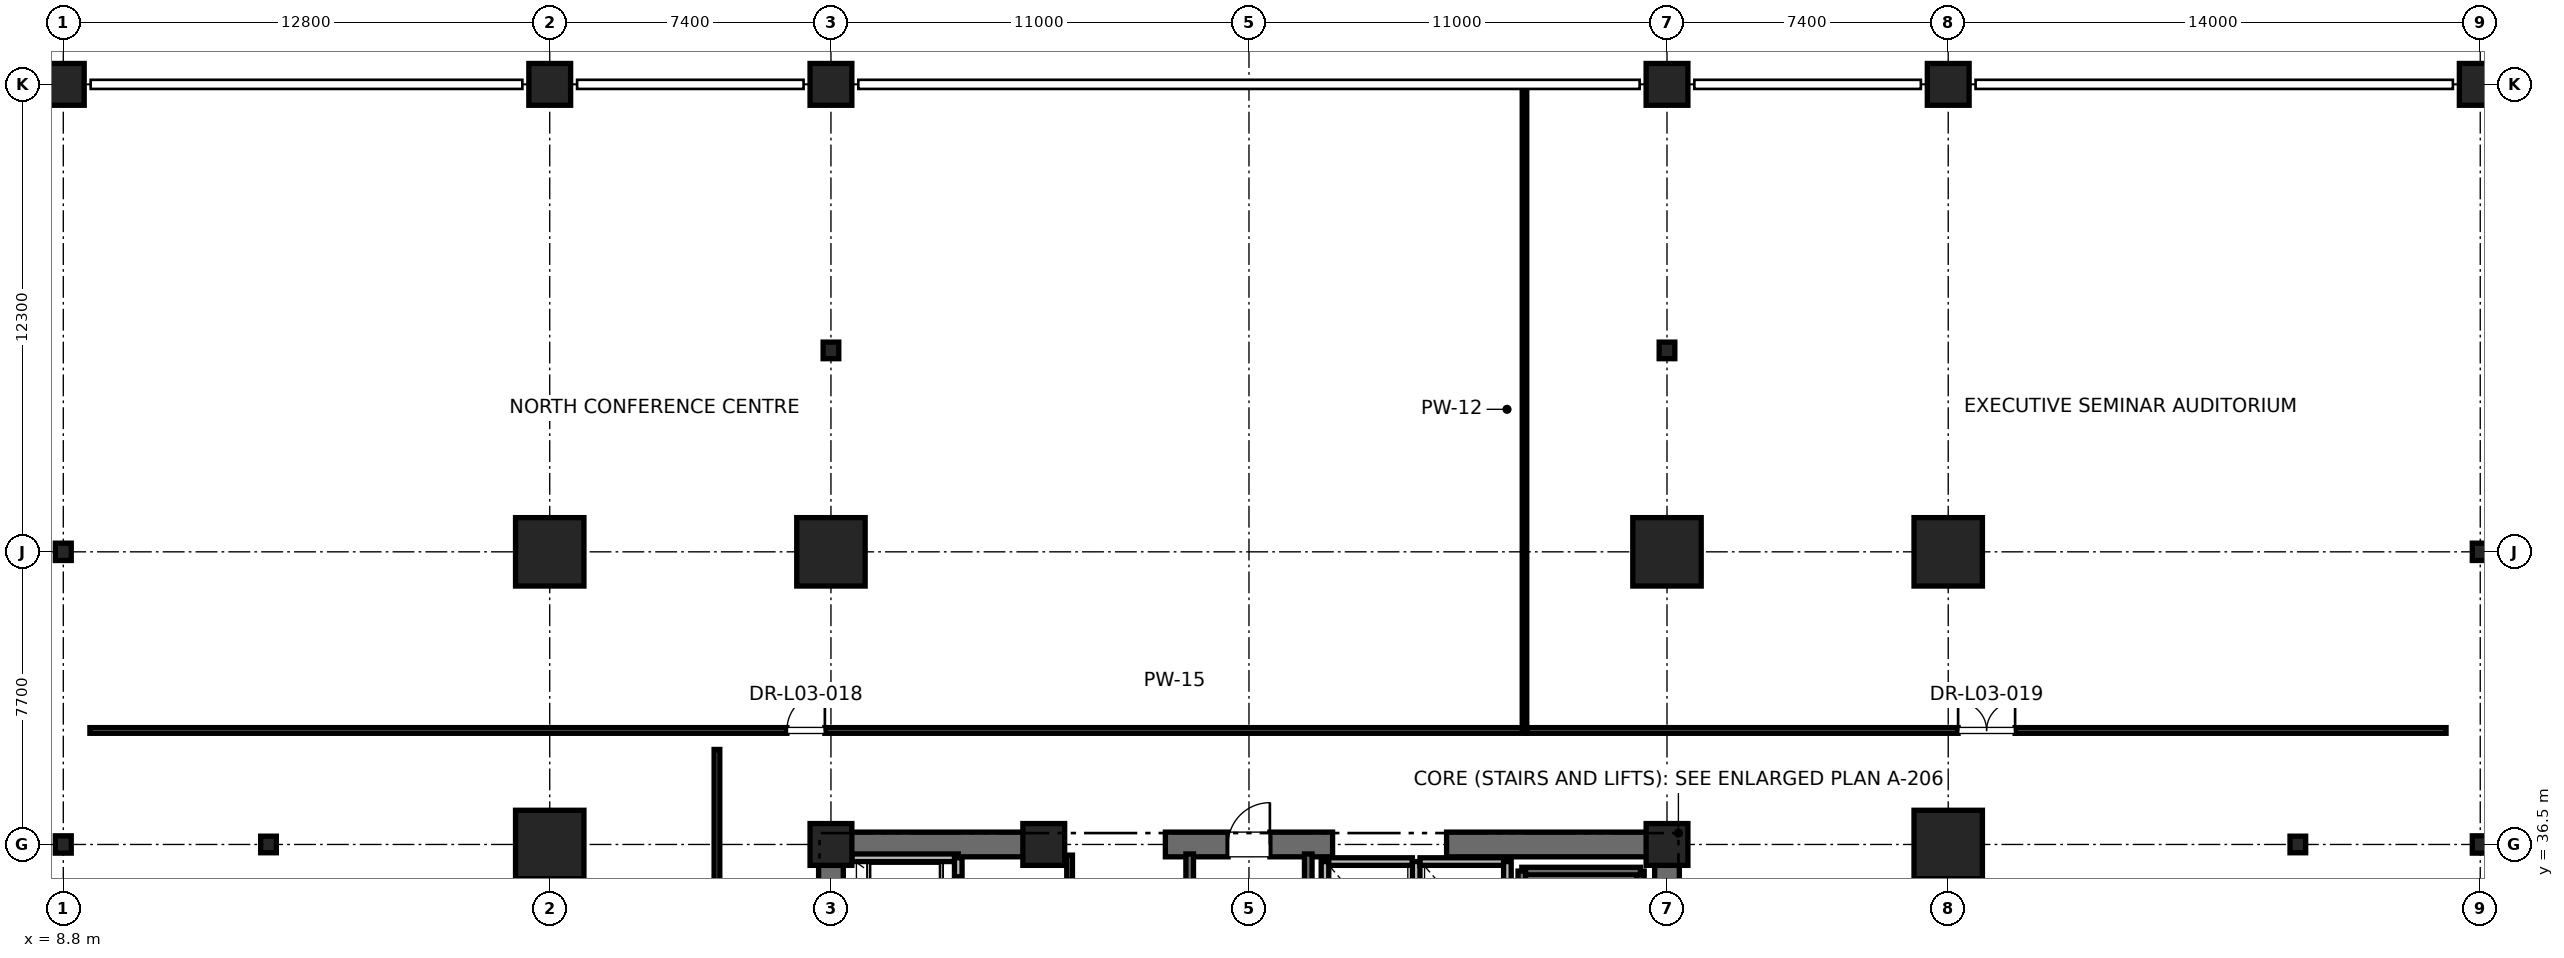
"""IFC4 building model, lengths in metres.
Left out: names, types, materials, properties, quantities, classifications, styles, units other than length and angle.
Written with IfcOpenShell. Run it as: python <this file> out.ifc"""

import sys

from ifc_helpers import new_model, si_unit, direction, frame, frame_2d, origin, origin_2d, place, context, subcontext, project, spatial, rectangle, i_section, extrude, element, fill, save


model = new_model("IFC4")
c1 = context("Model", 3, precision=1e-05, world=origin(), true_north=direction((0.0, 1.0)))
c2 = subcontext(c1, "Body", "Model", "MODEL_VIEW")
j1 = project(units=[si_unit("LENGTHUNIT", "METRE"), si_unit("PLANEANGLEUNIT", "RADIAN")], contexts=[c1])
p1 = place(None, origin())
s1 = spatial("IfcSite", under=j1, at=p1, CompositionType="ELEMENT")
p2 = place(p1, origin())
s2 = spatial("IfcBuilding", under=s1, at=p2, CompositionType="ELEMENT")
p3 = place(p2, frame((0.0, 0.0, 16.4)))
s3 = spatial("IfcBuildingStorey", under=s2, at=p3, CompositionType="ELEMENT", Elevation=16.4)
for number, where, z_axis, x_axis in (
    (1, (29.0, 44.2, 0.0), (0.0, 0.0, 1.0), (1.0, 0.0, 0.0)),
    (2, (51.0, 44.2, 0.0), (0.0, 0.0, 1.0), (1.0, 0.0, 0.0)),
    (3, (21.6, 36.5, 0.0), (0.0, 0.0, 1.0), (1.0, 0.0, 0.0)),
    (4, (58.4, 36.5, 0.0), (0.0, 0.0, 1.0), (1.0, 0.0, 0.0)),
    (5, (21.6, 44.2, 0.0), (0.0, 0.0, 1.0), (1.0, 0.0, 0.0)),
    (6, (58.4, 44.2, 0.0), (0.0, 0.0, 1.0), (1.0, 0.0, 0.0)),
):
    element("IfcColumn", number, at=place(p3, frame(where, z_axis=z_axis, x_axis=x_axis)), inside=s3, PredefinedType="COLUMN", context=c2, shape_type="SweptSolid", body=[
        extrude(rectangle(XDim=1.8, YDim=1.8, at=origin_2d()), origin(), (0.0, 0.0, 1.0), 5.2),
    ])
for number, where, z_axis, x_axis in (
    (7, (14.2, 36.5, 0.0), (0.0, 0.0, 1.0), (1.0, 0.0, 0.0)),
    (8, (67.6, 36.5, 0.0), (0.0, 0.0, 1.0), (1.0, 0.0, 0.0)),
    (9, (29.0, 49.5, 0.0), (0.0, 0.0, 1.0), (1.0, 0.0, 0.0)),
    (10, (51.0, 49.5, 0.0), (0.0, 0.0, 1.0), (1.0, 0.0, 0.0)),
):
    element("IfcColumn", number, at=place(p3, frame(where, z_axis=z_axis, x_axis=x_axis)), inside=s3, PredefinedType="COLUMN", context=c2, shape_type="SweptSolid", body=[
        extrude(i_section(OverallWidth=0.412, OverallDepth=0.437, WebThickness=0.036, FlangeThickness=0.058, FilletRadius=0.015, at=origin_2d()), origin(), (0.0, 0.0, 1.0), 5.2),
    ])
for number, where, z_axis, x_axis in (
    (11, (29.0, 36.5, 0.0), (0.0, 0.0, 1.0), (1.0, 0.0, 0.0)),
    (12, (51.0, 36.5, 0.0), (0.0, 0.0, 1.0), (1.0, 0.0, 0.0)),
    (13, (34.6, 36.5, 0.0), (0.0, 0.0, 1.0), (1.0, 0.0, 0.0)),
):
    element("IfcColumn", number, at=place(p3, frame(where, z_axis=z_axis, x_axis=x_axis)), inside=s3, PredefinedType="PILASTER", context=c2, shape_type="SweptSolid", body=[
        extrude(rectangle(XDim=1.1, YDim=1.1, at=origin_2d()), origin(), (0.0, 0.0, 1.0), 5.2),
    ])
for number, where, z_axis, x_axis in (
    (14, (8.8, 56.5, 0.0), (0.0, 0.0, 1.0), (1.0, 0.0, 0.0)),
    (15, (21.6, 56.5, 0.0), (0.0, 0.0, 1.0), (1.0, 0.0, 0.0)),
    (16, (29.0, 56.5, 0.0), (0.0, 0.0, 1.0), (1.0, 0.0, 0.0)),
    (17, (51.0, 56.5, 0.0), (0.0, 0.0, 1.0), (1.0, 0.0, 0.0)),
    (18, (58.4, 56.5, 0.0), (0.0, 0.0, 1.0), (1.0, 0.0, 0.0)),
    (19, (72.4, 56.5, 0.0), (0.0, 0.0, 1.0), (1.0, 0.0, 0.0)),
):
    element("IfcColumn", number, at=place(p3, frame(where, z_axis=z_axis, x_axis=x_axis)), inside=s3, PredefinedType="COLUMN", context=c2, shape_type="SweptSolid", body=[
        extrude(rectangle(XDim=1.1, YDim=1.1, at=origin_2d()), origin(), (0.0, 0.0, 1.0), 5.2),
    ])
for number, where, z_axis, x_axis in (
    (20, (8.8, 36.5, 0.0), (0.0, 0.0, 1.0), (1.0, 0.0, 0.0)),
    (21, (8.8, 44.2, 0.0), (0.0, 0.0, 1.0), (1.0, 0.0, 0.0)),
    (22, (72.4, 36.5, 0.0), (0.0, 0.0, 1.0), (1.0, 0.0, 0.0)),
    (23, (72.4, 44.2, 0.0), (0.0, 0.0, 1.0), (1.0, 0.0, 0.0)),
):
    element("IfcColumn", number, at=place(p3, frame(where, z_axis=z_axis, x_axis=x_axis)), inside=s3, PredefinedType="COLUMN", context=c2, shape_type="SweptSolid", body=[
        extrude(i_section(OverallWidth=0.418, OverallDepth=0.456, WebThickness=0.042, FlangeThickness=0.067, FilletRadius=0.015, at=origin_2d()), origin(), (0.0, 0.0, 1.0), 5.2),
    ])
p4 = place(p3, frame((29.0, 36.5, 0.0), z_axis=(0.0, 0.0, 1.0), x_axis=(1.0, 0.0, 0.0)))
e24 = element("IfcWall", 24, at=p4, inside=s3, PredefinedType="SHEAR", context=c2, shape_type="SweptSolid", body=[
    extrude(rectangle(XDim=5.8, YDim=0.65, at=frame_2d((2.9, 0.0))), origin(), (0.0, 0.0, 1.0), 4.9),
])
p5 = place(p3, frame((37.8, 36.5, 0.0), z_axis=(0.0, 0.0, 1.0), x_axis=(1.0, 0.0, 0.0)))
e25 = element("IfcWall", 25, at=p5, inside=s3, PredefinedType="SHEAR", context=c2, shape_type="SweptSolid", body=[
    extrude(rectangle(XDim=4.4, YDim=0.65, at=frame_2d((2.2, 0.0))), origin(), (0.0, 0.0, 1.0), 4.9),
])
p6 = place(p5, frame((1.65, 0.0, 0.0)))
e26 = element("IfcOpeningElement", 26, at=p6, cuts=e25, PredefinedType="OPENING", context=c2, shape_type="SweptSolid", body=[
    extrude(rectangle(XDim=1.1, YDim=2.15, at=frame_2d((0.55, 1.075))), frame((0.0, 0.325, 0.0), z_axis=(0.0, -1.0, 0.0), x_axis=(1.0, 0.0, 0.0)), (0.0, 0.0, 1.0), 0.65),
])
for number, where, z_axis, x_axis in (
    (27, (45.2, 36.5, 0.0), (0.0, 0.0, 1.0), (1.0, 0.0, 0.0)),
    (28, (29.0, 30.7, 0.0), (0.0, 0.0, 1.0), (0.0, 1.0, 0.0)),
):
    element("IfcWall", number, at=place(p3, frame(where, z_axis=z_axis, x_axis=x_axis)), inside=s3, PredefinedType="SHEAR", context=c2, shape_type="SweptSolid", body=[
        extrude(rectangle(XDim=5.8, YDim=0.65, at=frame_2d((2.9, 0.0))), origin(), (0.0, 0.0, 1.0), 4.9),
    ])
p7 = place(p3, frame((51.0, 27.7, 0.0), z_axis=(0.0, 0.0, 1.0), x_axis=(0.0, 1.0, 0.0)))
e29 = element("IfcWall", 29, at=p7, inside=s3, PredefinedType="SHEAR", context=c2, shape_type="SweptSolid", body=[
    extrude(rectangle(XDim=8.8, YDim=0.65, at=frame_2d((4.4, 0.0))), origin(), (0.0, 0.0, 1.0), 4.9),
])
p8 = place(p3, frame((50.3, 27.65, 0.0), z_axis=(0.0, 0.0, 1.0), x_axis=(0.0, 1.0, 0.0)))
e30 = element("IfcWall", 30, at=p8, inside=s3, PredefinedType="SOLIDWALL", context=c2, shape_type="SweptSolid", body=[
    extrude(rectangle(XDim=8.15, YDim=0.2, at=frame_2d((4.075, 0.0))), origin(), (0.0, 0.0, 1.0), 4.9),
])
p9 = place(p3, frame((47.18, 35.8, 0.0), z_axis=(0.0, 0.0, 1.0), x_axis=(1.0, 0.0, 0.0)))
e31 = element("IfcWall", 31, at=p9, inside=s3, PredefinedType="SOLIDWALL", context=c2, shape_type="SweptSolid", body=[
    extrude(rectangle(XDim=3.12, YDim=0.2, at=frame_2d((1.56, 0.0))), origin(), (0.0, 0.0, 1.0), 4.9),
])
p10 = place(p3, frame((47.18, 27.62, 0.0), z_axis=(0.0, 0.0, 1.0), x_axis=(0.0, 1.0, 0.0)))
e32 = element("IfcWall", 32, at=p10, inside=s3, PredefinedType="SOLIDWALL", context=c2, shape_type="SweptSolid", body=[
    extrude(rectangle(XDim=8.18, YDim=0.2, at=frame_2d((4.09, 0.0))), origin(), (0.0, 0.0, 1.0), 4.9),
])
p11 = place(p3, frame((38.44, 27.38, 0.0), z_axis=(0.0, 0.0, 1.0), x_axis=(0.0, 1.0, 0.0)))
e33 = element("IfcWall", 33, at=p11, inside=s3, PredefinedType="SOLIDWALL", context=c2, shape_type="SweptSolid", body=[
    extrude(rectangle(XDim=8.87, YDim=0.2, at=frame_2d((4.435, 0.0))), origin(), (0.0, 0.0, 1.0), 4.9),
])
p12 = place(p3, frame((41.56, 27.68, 0.0), z_axis=(0.0, 0.0, 1.0), x_axis=(0.0, 1.0, 0.0)))
e34 = element("IfcWall", 34, at=p12, inside=s3, PredefinedType="SOLIDWALL", context=c2, shape_type="SweptSolid", body=[
    extrude(rectangle(XDim=8.57, YDim=0.2, at=frame_2d((4.285, 0.0))), origin(), (0.0, 0.0, 1.0), 4.9),
])
p13 = place(p3, frame((32.35, 36.15, 0.0), z_axis=(0.0, 0.0, 1.0), x_axis=(-1.0, 0.0, 0.0)))
e35 = element("IfcWall", 35, at=p13, inside=s3, PredefinedType="SOLIDWALL", context=c2, shape_type="SweptSolid", body=[
    extrude(rectangle(XDim=2.8, YDim=0.2, at=frame_2d((1.4, 0.0))), origin(), (0.0, 0.0, 1.0), 3.959),
])
p14 = place(p3, frame((32.35, 34.05, 0.0), z_axis=(0.0, 0.0, 1.0), x_axis=(0.0, 1.0, 0.0)))
e36 = element("IfcWall", 36, at=p14, inside=s3, PredefinedType="SOLIDWALL", context=c2, shape_type="SweptSolid", body=[
    extrude(rectangle(XDim=2.1, YDim=0.2, at=frame_2d((1.05, 0.0))), origin(), (0.0, 0.0, 1.0), 4.9),
])
p15 = place(p14, frame((0.5, 0.0, 0.0)))
e37 = element("IfcOpeningElement", 37, at=p15, cuts=e36, PredefinedType="OPENING", context=c2, shape_type="SweptSolid", body=[
    extrude(rectangle(XDim=1.1, YDim=2.2, at=frame_2d((0.55, 1.1))), frame((0.0, 0.1, 0.0), z_axis=(0.0, -1.0, 0.0), x_axis=(1.0, 0.0, 0.0)), (0.0, 0.0, 1.0), 0.2),
])
p16 = place(p3, frame((44.3, 36.05, 0.0), z_axis=(0.0, 0.0, 1.0), x_axis=(-1.0, 0.0, 0.0)))
e38 = element("IfcWall", 38, at=p16, inside=s3, PredefinedType="SOLIDWALL", context=c2, shape_type="SweptSolid", body=[
    extrude(rectangle(XDim=2.3, YDim=0.2, at=frame_2d((1.15, 0.0))), origin(), (0.0, 0.0, 1.0), 3.68),
])
for number, where, z_axis, x_axis in (
    (39, (42.0, 36.05, 0.0), (0.0, 0.0, 1.0), (0.0, -1.0, 0.0)),
    (40, (44.4, 33.45, 0.0), (0.0, 0.0, 1.0), (0.0, 1.0, 0.0)),
):
    element("IfcWall", number, at=place(p3, frame(where, z_axis=z_axis, x_axis=x_axis)), inside=s3, PredefinedType="SOLIDWALL", context=c2, shape_type="SweptSolid", body=[
        extrude(rectangle(XDim=2.6, YDim=0.2, at=frame_2d((1.3, 0.0))), origin(), (0.0, 0.0, 1.0), 3.68),
    ])
p17 = place(p3, frame((46.8, 36.05, 0.0), z_axis=(0.0, 0.0, 1.0), x_axis=(-1.0, 0.0, 0.0)))
e41 = element("IfcWall", 41, at=p17, inside=s3, PredefinedType="SOLIDWALL", context=c2, shape_type="SweptSolid", body=[
    extrude(rectangle(XDim=2.3, YDim=0.2, at=frame_2d((1.15, 0.0))), origin(), (0.0, 0.0, 1.0), 3.68),
])
p18 = place(p3, frame((46.8, 33.45, 0.0), z_axis=(0.0, 0.0, 1.0), x_axis=(0.0, 1.0, 0.0)))
e42 = element("IfcWall", 42, at=p18, inside=s3, PredefinedType="SOLIDWALL", context=c2, shape_type="SweptSolid", body=[
    extrude(rectangle(XDim=2.6, YDim=0.2, at=frame_2d((1.3, 0.0))), origin(), (0.0, 0.0, 1.0), 4.9),
])
p19 = place(p3, frame((35.28, 33.95, 0.0), z_axis=(0.0, 0.0, 1.0), x_axis=(0.0, 1.0, 0.0)))
e43 = element("IfcWall", 43, at=p19, inside=s3, PredefinedType="PARTITIONING", context=c2, shape_type="SweptSolid", body=[
    extrude(rectangle(XDim=2.27, YDim=0.15, at=frame_2d((1.135, 0.0))), origin(), (0.0, 0.0, 1.0), 2.85),
])
p20 = place(p19, frame((0.66, 0.0, 0.0)))
e44 = element("IfcOpeningElement", 44, at=p20, cuts=e43, PredefinedType="OPENING", context=c2, shape_type="SweptSolid", body=[
    extrude(rectangle(XDim=0.95, YDim=2.15, at=frame_2d((0.475, 1.075))), frame((0.0, 0.075, 0.0), z_axis=(0.0, -1.0, 0.0), x_axis=(1.0, 0.0, 0.0)), (0.0, 0.0, 1.0), 0.15),
])
p21 = place(p3, frame((9.5, 39.5, 0.0), z_axis=(0.0, 0.0, 1.0), x_axis=(1.0, 0.0, 0.0)))
e45 = element("IfcWall", 45, at=p21, inside=s3, PredefinedType="PARTITIONING", context=c2, shape_type="SweptSolid", body=[
    extrude(rectangle(XDim=37.75, YDim=0.15, at=frame_2d((18.875, 0.0))), origin(), (0.0, 0.0, 1.0), 2.85),
])
p22 = place(p21, frame((18.34, 0.0, 0.0)))
e46 = element("IfcOpeningElement", 46, at=p22, cuts=e45, PredefinedType="OPENING", context=c2, shape_type="SweptSolid", body=[
    extrude(rectangle(XDim=1.0, YDim=2.15, at=frame_2d((0.5, 1.075))), frame((0.0, 0.075, 0.0), z_axis=(0.0, -1.0, 0.0), x_axis=(1.0, 0.0, 0.0)), (0.0, 0.0, 1.0), 0.15),
])
p23 = place(p3, frame((47.25, 39.5, 0.0), z_axis=(0.0, 0.0, 1.0), x_axis=(0.0, 1.0, 0.0)))
e47 = element("IfcWall", 47, at=p23, inside=s3, PredefinedType="PARTITIONING", context=c2, shape_type="SweptSolid", body=[
    extrude(rectangle(XDim=16.9, YDim=0.12, at=frame_2d((8.45, 0.0))), origin(), (0.0, 0.0, 1.0), 2.85),
])
p24 = place(p3, frame((47.32, 39.5, 0.0), z_axis=(0.0, 0.0, 1.0), x_axis=(1.0, 0.0, 0.0)))
e48 = element("IfcWall", 48, at=p24, inside=s3, PredefinedType="PARTITIONING", context=c2, shape_type="SweptSolid", body=[
    extrude(rectangle(XDim=24.18, YDim=0.15, at=frame_2d((12.09, 0.0))), origin(), (0.0, 0.0, 1.0), 2.85),
])
p25 = place(p24, frame((11.34, 0.0, 0.0)))
e49 = element("IfcOpeningElement", 49, at=p25, cuts=e48, PredefinedType="OPENING", context=c2, shape_type="SweptSolid", body=[
    extrude(rectangle(XDim=1.5, YDim=2.25, at=frame_2d((0.75, 1.125))), frame((0.0, 0.075, 0.0), z_axis=(0.0, -1.0, 0.0), x_axis=(1.0, 0.0, 0.0)), (0.0, 0.0, 1.0), 0.15),
])
p26 = place(p3, frame((26.0, 22.05, 0.0), z_axis=(0.0, 0.0, 1.0), x_axis=(0.0, 1.0, 0.0)))
e50 = element("IfcWall", 50, at=p26, inside=s3, PredefinedType="PARTITIONING", context=c2, shape_type="SweptSolid", body=[
    extrude(rectangle(XDim=16.95, YDim=0.15, at=frame_2d((8.475, 0.0))), origin(), (0.0, 0.0, 1.0), 2.85),
])
p27 = place(p26, frame((6.675, 0.0, 0.0)))
e51 = element("IfcOpeningElement", 51, at=p27, cuts=e50, PredefinedType="OPENING", context=c2, shape_type="SweptSolid", body=[
    extrude(rectangle(XDim=1.0, YDim=2.15, at=frame_2d((0.5, 1.075))), frame((0.0, 0.075, 0.0), z_axis=(0.0, -1.0, 0.0), x_axis=(1.0, 0.0, 0.0)), (0.0, 0.0, 1.0), 0.15),
])
p28 = place(p6, origin())
e52 = element("IfcDoor", 52, at=p28, inside=s3, OperationType="SINGLE_SWING_RIGHT", PredefinedType="DOOR", context=c2, shape_type="SweptSolid", body=[
    extrude(rectangle(XDim=1.1, YDim=2.15, at=frame_2d((0.55, 1.075))), frame((0.0, 0.025, 0.0), z_axis=(0.0, -1.0, 0.0), x_axis=(1.0, 0.0, 0.0)), (0.0, 0.0, 1.0), 0.05),
])
fill(e26, e52)
p29 = place(p15, origin())
e53 = element("IfcDoor", 53, at=p29, inside=s3, OperationType="SLIDING_TO_RIGHT", PredefinedType="DOOR", context=c2, shape_type="SweptSolid", body=[
    extrude(rectangle(XDim=1.1, YDim=2.2, at=frame_2d((0.55, 1.1))), frame((0.0, 0.025, 0.0), z_axis=(0.0, -1.0, 0.0), x_axis=(1.0, 0.0, 0.0)), (0.0, 0.0, 1.0), 0.05),
])
fill(e37, e53)
p30 = place(p22, origin())
e54 = element("IfcDoor", 54, at=p30, inside=s3, OperationType="SINGLE_SWING_RIGHT", PredefinedType="DOOR", context=c2, shape_type="SweptSolid", body=[
    extrude(rectangle(XDim=1.0, YDim=2.15, at=frame_2d((0.5, 1.075))), frame((0.0, 0.025, 0.0), z_axis=(0.0, -1.0, 0.0), x_axis=(1.0, 0.0, 0.0)), (0.0, 0.0, 1.0), 0.05),
])
fill(e46, e54)
p31 = place(p25, origin())
e55 = element("IfcDoor", 55, at=p31, inside=s3, OperationType="DOUBLE_DOOR_SINGLE_SWING", PredefinedType="DOOR", context=c2, shape_type="SweptSolid", body=[
    extrude(rectangle(XDim=1.5, YDim=2.25, at=frame_2d((0.75, 1.125))), frame((0.0, 0.025, 0.0), z_axis=(0.0, -1.0, 0.0), x_axis=(1.0, 0.0, 0.0)), (0.0, 0.0, 1.0), 0.05),
])
fill(e49, e55)
save(model, sys.argv[1])
